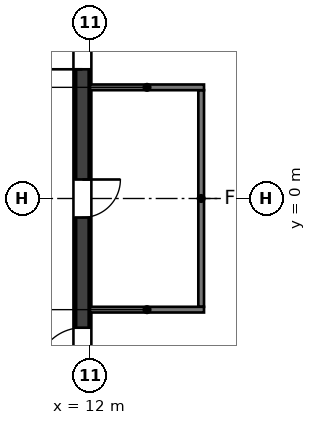
"""IFC4 building model, lengths in metres.
Left out: names, types, materials, properties, quantities, classifications, styles, units other than length and angle.
Written with IfcOpenShell. Run it as: python <this file> out.ifc"""

import sys

from ifc_helpers import new_model, si_unit, direction, frame, frame_2d, origin, place, context, subcontext, project, spatial, rectangle, extrude, element, fill, save


model = new_model("IFC4")
c1 = context("Model", 3, precision=1e-05, world=origin(), true_north=direction((0.0, 1.0)))
c2 = subcontext(c1, "Body", "Model", "MODEL_VIEW")
j1 = project(units=[si_unit("LENGTHUNIT", "METRE"), si_unit("PLANEANGLEUNIT", "RADIAN")], contexts=[c1])
p1 = place(None, origin())
s1 = spatial("IfcSite", under=j1, at=p1, CompositionType="ELEMENT")
p2 = place(p1, origin())
s2 = spatial("IfcBuilding", under=s1, at=p2, CompositionType="ELEMENT")
p3 = place(p2, frame((0.0, 0.0, 291.0)))
s3 = spatial("IfcBuildingStorey", under=s2, at=p3, CompositionType="ELEMENT", Elevation=291.0)
p4 = place(p3, frame((11.8, -5.5, 0.0), z_axis=(0.0, 0.0, 1.0), x_axis=(0.0, 1.0, 0.0)))
e1 = element("IfcWall", 1, at=p4, inside=s3, PredefinedType="SHEAR", context=c2, shape_type="SweptSolid", body=[
    extrude(rectangle(XDim=11.0, YDim=0.4, at=frame_2d((5.5, 0.0))), origin(), (0.0, 0.0, 1.0), 4.0),
])
p5 = place(p4, frame((5.0, 0.0, 0.0)))
e2 = element("IfcOpeningElement", 2, at=p5, cuts=e1, PredefinedType="OPENING", context=c2, shape_type="SweptSolid", body=[
    extrude(rectangle(XDim=1.0, YDim=2.1, at=frame_2d((0.5, 1.05))), frame((0.0, 0.2, 0.0), z_axis=(0.0, -1.0, 0.0), x_axis=(1.0, 0.0, 0.0)), (0.0, 0.0, 1.0), 0.4),
])
p6 = place(p4, frame((0.9, 0.0, 0.0)))
e3 = element("IfcOpeningElement", 3, at=p6, cuts=e1, PredefinedType="OPENING", context=c2, shape_type="SweptSolid", body=[
    extrude(rectangle(XDim=1.2, YDim=2.1, at=frame_2d((0.6, 1.05))), frame((0.0, 0.2, 0.0), z_axis=(0.0, -1.0, 0.0), x_axis=(1.0, 0.0, 0.0)), (0.0, 0.0, 1.0), 0.4),
])
p7 = place(p4, frame((8.9, 0.0, 0.0)))
e4 = element("IfcOpeningElement", 4, at=p7, cuts=e1, PredefinedType="OPENING", context=c2, shape_type="SweptSolid", body=[
    extrude(rectangle(XDim=1.2, YDim=2.1, at=frame_2d((0.6, 1.05))), frame((0.0, 0.2, 0.0), z_axis=(0.0, -1.0, 0.0), x_axis=(1.0, 0.0, 0.0)), (0.0, 0.0, 1.0), 0.4),
])
p8 = place(p3, frame((14.925, -2.85, 0.0), z_axis=(0.0, 0.0, 1.0), x_axis=(0.0, 1.0, 0.0)))
e5 = element("IfcWall", 5, at=p8, inside=s3, PredefinedType="PARTITIONING", context=c2, shape_type="SweptSolid", body=[
    extrude(rectangle(XDim=5.7, YDim=0.15, at=frame_2d((2.85, 0.0))), origin(), (0.0, 0.0, 1.0), 2.927),
])
for number, where, z_axis, x_axis in (
    (6, (12.0, 2.925, 0.0), (0.0, 0.0, 1.0), (1.0, 0.0, 0.0)),
    (7, (12.0, -2.925, 0.0), (0.0, 0.0, 1.0), (1.0, 0.0, 0.0)),
):
    element("IfcWall", number, at=place(p3, frame(where, z_axis=z_axis, x_axis=x_axis)), inside=s3, PredefinedType="PARTITIONING", context=c2, shape_type="SweptSolid", body=[
        extrude(rectangle(XDim=3.0, YDim=0.15, at=frame_2d((1.5, 0.0))), origin(), (0.0, 0.0, 1.0), 3.85),
    ])
p9 = place(p5, origin())
e8 = element("IfcDoor", 8, at=p9, inside=s3, OperationType="SINGLE_SWING_RIGHT", PredefinedType="DOOR", context=c2, shape_type="SweptSolid", body=[
    extrude(rectangle(XDim=1.0, YDim=2.1, at=frame_2d((0.5, 1.05))), frame((0.0, 0.025, 0.0), z_axis=(0.0, -1.0, 0.0), x_axis=(1.0, 0.0, 0.0)), (0.0, 0.0, 1.0), 0.05),
])
fill(e2, e8)
p10 = place(p6, origin())
e9 = element("IfcDoor", 9, at=p10, inside=s3, OperationType="SINGLE_SWING_LEFT", PredefinedType="DOOR", context=c2, shape_type="SweptSolid", body=[
    extrude(rectangle(XDim=1.2, YDim=2.1, at=frame_2d((0.6, 1.05))), frame((0.0, 0.025, 0.0), z_axis=(0.0, -1.0, 0.0), x_axis=(1.0, 0.0, 0.0)), (0.0, 0.0, 1.0), 0.05),
])
fill(e3, e9)
p11 = place(p7, origin())
e10 = element("IfcDoor", 10, at=p11, inside=s3, OperationType="SINGLE_SWING_LEFT", PredefinedType="DOOR", context=c2, shape_type="SweptSolid", body=[
    extrude(rectangle(XDim=1.2, YDim=2.1, at=frame_2d((0.6, 1.05))), frame((0.0, 0.025, 0.0), z_axis=(0.0, -1.0, 0.0), x_axis=(1.0, 0.0, 0.0)), (0.0, 0.0, 1.0), 0.05),
])
fill(e4, e10)
save(model, sys.argv[1])
